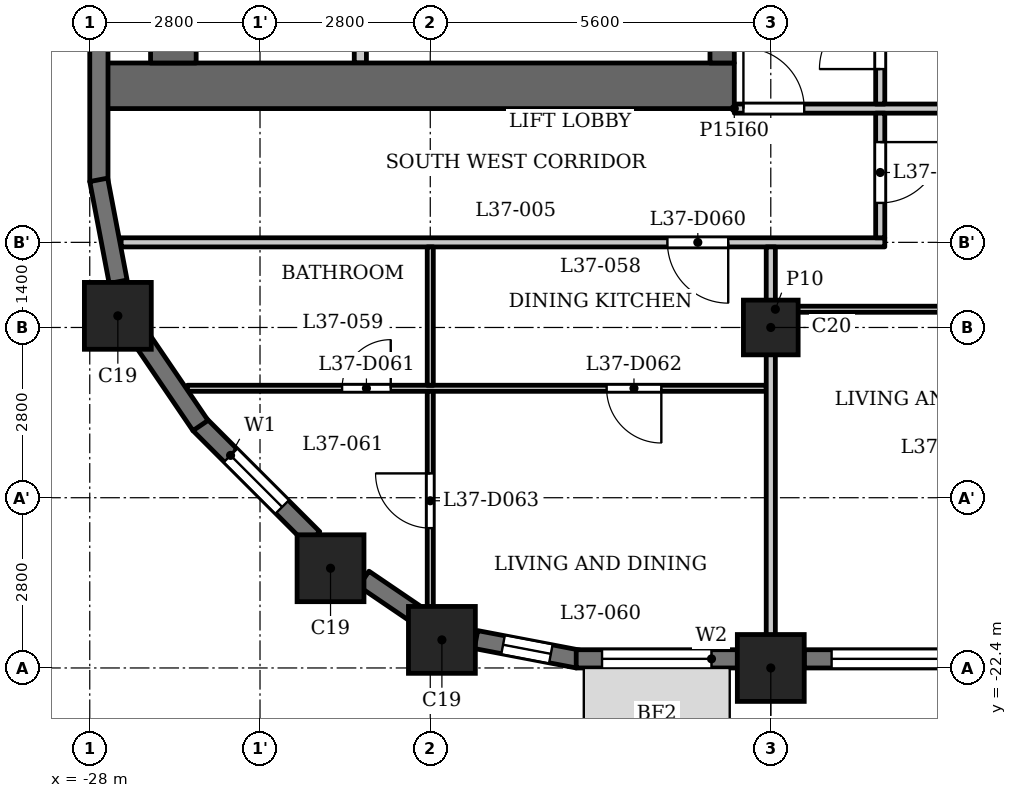
"""IFC4 building model, lengths in metres.
Left out: names, types, materials, properties, quantities, classifications, styles, units other than length and angle.
Written with IfcOpenShell. Run it as: python <this file> out.ifc"""

import sys

from ifc_helpers import new_model, si_unit, direction, frame, frame_2d, origin, origin_2d, place, context, subcontext, project, spatial, rectangle, extrude, element, fill, save


model = new_model("IFC4")
c1 = context("Model", 3, precision=1e-05, world=origin(), true_north=direction((0.0, 1.0)))
c2 = subcontext(c1, "Body", "Model", "MODEL_VIEW")
j1 = project(units=[si_unit("LENGTHUNIT", "METRE"), si_unit("PLANEANGLEUNIT", "RADIAN")], contexts=[c1])
p1 = place(None, origin())
s1 = spatial("IfcSite", under=j1, at=p1, CompositionType="ELEMENT")
p2 = place(p1, origin())
s2 = spatial("IfcBuilding", under=s1, at=p2, CompositionType="ELEMENT")
p3 = place(p2, frame((0.0, 0.0, 146.6)))
s3 = spatial("IfcBuildingStorey", under=s2, at=p3, CompositionType="ELEMENT", Elevation=146.6)
for number, where, z_axis, x_axis in (
    (1, (-22.209, -21.938, 0.0), (0.0, 0.0, 1.0), (1.0, 0.0, 0.0)),
    (2, (-16.8, -22.4, 0.0), (0.0, 0.0, 1.0), (1.0, 0.0, 0.0)),
    (3, (-27.538, -16.609, 0.0), (0.0, 0.0, 1.0), (1.0, 0.0, 0.0)),
    (4, (-24.04, -20.76, 0.0), (0.0, 0.0, 1.0), (1.0, 0.0, 0.0)),
):
    element("IfcColumn", number, at=place(p3, frame(where, z_axis=z_axis, x_axis=x_axis)), inside=s3, PredefinedType="COLUMN", context=c2, shape_type="SweptSolid", body=[
        extrude(rectangle(XDim=1.1, YDim=1.1, at=origin_2d()), origin(), (0.0, 0.0, 1.0), 3.5),
    ])
p4 = place(p3, frame((-16.8, -16.8, 0.0), z_axis=(0.0, 0.0, 1.0), x_axis=(1.0, 0.0, 0.0)))
e5 = element("IfcColumn", 5, at=p4, inside=s3, PredefinedType="COLUMN", context=c2, shape_type="SweptSolid", body=[
    extrude(rectangle(XDim=0.9, YDim=0.9, at=origin_2d()), origin(), (0.0, 0.0, 1.0), 3.5),
])
p5 = place(p3, frame((-26.197, -18.391, 0.0), z_axis=(0.0, 0.0, 1.0), x_axis=(0.707060717099, -0.707152842274, 0.0)))
e6 = element("IfcWall", 6, at=p5, inside=s3, PredefinedType="SOLIDWALL", context=c2, shape_type="SweptSolid", body=[
    extrude(rectangle(XDim=2.65, YDim=0.3, at=frame_2d((1.325, 0.0))), origin(), (0.0, 0.0, 1.0), 2.45),
])
p6 = place(p5, frame((0.725, 0.0, 0.6)))
e7 = element("IfcOpeningElement", 7, at=p6, cuts=e6, PredefinedType="OPENING", context=c2, shape_type="SweptSolid", body=[
    extrude(rectangle(XDim=1.2, YDim=1.55, at=frame_2d((0.6, 0.775))), frame((0.0, 0.16, 0.0), z_axis=(0.0, -1.0, 0.0), x_axis=(1.0, 0.0, 0.0)), (0.0, 0.0, 1.0), 0.32),
])
p7 = place(p3, frame((-23.492, -20.932, 0.0), z_axis=(0.0, 0.0, 1.0), x_axis=(0.826993959827, -0.562210806023, 0.0)))
e8 = element("IfcWall", 8, at=p7, inside=s3, PredefinedType="SOLIDWALL", context=c2, shape_type="SweptSolid", body=[
    extrude(rectangle(XDim=1.077, YDim=0.3, at=frame_2d((0.539, 0.0))), origin(), (0.0, 0.0, 1.0), 3.2),
])
p8 = place(p3, frame((-21.648, -21.933, 0.0), z_axis=(0.0, 0.0, 1.0), x_axis=(0.982297206936, -0.187329114784, 0.0)))
e9 = element("IfcWall", 9, at=p8, inside=s3, PredefinedType="SOLIDWALL", context=c2, shape_type="SweptSolid", body=[
    extrude(rectangle(XDim=1.706, YDim=0.3, at=frame_2d((0.853, 0.0))), origin(), (0.0, 0.0, 1.0), 2.45),
])
p9 = place(p8, frame((0.453, 0.0, 0.6)))
e10 = element("IfcOpeningElement", 10, at=p9, cuts=e9, PredefinedType="OPENING", context=c2, shape_type="SweptSolid", body=[
    extrude(rectangle(XDim=0.8, YDim=1.55, at=frame_2d((0.4, 0.775))), frame((0.0, 0.16, 0.0), z_axis=(0.0, -1.0, 0.0), x_axis=(1.0, 0.0, 0.0)), (0.0, 0.0, 1.0), 0.32),
])
p10 = place(p3, frame((-20.0, -22.25, 0.0), z_axis=(0.0, 0.0, 1.0), x_axis=(1.0, 0.0, 0.0)))
e11 = element("IfcWall", 11, at=p10, inside=s3, PredefinedType="SOLIDWALL", context=c2, shape_type="SweptSolid", body=[
    extrude(rectangle(XDim=2.65, YDim=0.3, at=frame_2d((1.325, 0.0))), origin(), (0.0, 0.0, 1.0), 2.45),
])
p11 = place(p10, frame((0.425, 0.0, 0.9)))
e12 = element("IfcOpeningElement", 12, at=p11, cuts=e11, PredefinedType="OPENING", context=c2, shape_type="SweptSolid", body=[
    extrude(rectangle(XDim=1.8, YDim=1.25, at=frame_2d((0.9, 0.625))), frame((0.0, 0.16, 0.0), z_axis=(0.0, -1.0, 0.0), x_axis=(1.0, 0.0, 0.0)), (0.0, 0.0, 1.0), 0.32),
])
p12 = place(p3, frame((-16.25, -22.25, 0.0), z_axis=(0.0, 0.0, 1.0), x_axis=(1.0, 0.0, 0.0)))
e13 = element("IfcWall", 13, at=p12, inside=s3, PredefinedType="SOLIDWALL", context=c2, shape_type="SweptSolid", body=[
    extrude(rectangle(XDim=4.5, YDim=0.3, at=frame_2d((2.25, 0.0))), origin(), (0.0, 0.0, 1.0), 2.45),
])
p13 = place(p12, frame((0.45, 0.0, 1.2)))
e14 = element("IfcOpeningElement", 14, at=p13, cuts=e13, PredefinedType="OPENING", context=c2, shape_type="SweptSolid", body=[
    extrude(rectangle(XDim=3.6, YDim=0.95, at=frame_2d((1.8, 0.475))), frame((0.0, 0.16, 0.0), z_axis=(0.0, -1.0, 0.0), x_axis=(1.0, 0.0, 0.0)), (0.0, 0.0, 1.0), 0.32),
])
p14 = place(p3, frame((-27.85, -11.75, 0.0), z_axis=(0.0, 0.0, 1.0), x_axis=(0.0, -1.0, 0.0)))
e15 = element("IfcWall", 15, at=p14, inside=s3, PredefinedType="SOLIDWALL", context=c2, shape_type="SweptSolid", body=[
    extrude(rectangle(XDim=2.65, YDim=0.3, at=frame_2d((1.325, 0.0))), origin(), (0.0, 0.0, 1.0), 2.45),
])
p15 = place(p3, frame((-27.853, -14.372, 0.0), z_axis=(0.0, 0.0, 1.0), x_axis=(0.187302784601, -0.982302227871, 0.0)))
e16 = element("IfcWall", 16, at=p15, inside=s3, PredefinedType="SOLIDWALL", context=c2, shape_type="SweptSolid", body=[
    extrude(rectangle(XDim=1.706, YDim=0.3, at=frame_2d((0.853, 0.0))), origin(), (0.0, 0.0, 1.0), 2.45),
])
p16 = place(p3, frame((-27.138, -17.002, 0.0), z_axis=(0.0, 0.0, 1.0), x_axis=(0.562075160946, -0.827086158419, 0.0)))
e17 = element("IfcWall", 17, at=p16, inside=s3, PredefinedType="SOLIDWALL", context=c2, shape_type="SweptSolid", body=[
    extrude(rectangle(XDim=1.706, YDim=0.3, at=frame_2d((0.853, 0.0))), origin(), (0.0, 0.0, 1.0), 2.45),
])
p17 = place(p3, frame((-17.4, -12.825, 0.0), z_axis=(0.0, 0.0, 1.0), x_axis=(-1.0, 0.0, 0.0)))
e18 = element("IfcWall", 18, at=p17, inside=s3, PredefinedType="SHEAR", context=c2, shape_type="SweptSolid", body=[
    extrude(rectangle(XDim=10.4, YDim=0.75, at=frame_2d((5.2, 0.0))), origin(), (0.0, 0.0, 1.0), 3.2),
])
p18 = place(p3, frame((-17.6, -12.45, 0.0), z_axis=(0.0, 0.0, 1.0), x_axis=(0.0, 1.0, 0.0)))
e19 = element("IfcWall", 19, at=p18, inside=s3, PredefinedType="SHEAR", context=c2, shape_type="SweptSolid", body=[
    extrude(rectangle(XDim=24.9, YDim=0.4, at=frame_2d((12.45, 0.0))), origin(), (0.0, 0.0, 1.0), 3.2),
])
p19 = place(p18, frame((6.325, 0.0, 0.0)))
e20 = element("IfcOpeningElement", 20, at=p19, cuts=e19, PredefinedType="OPENING", context=c2, shape_type="SweptSolid", body=[
    extrude(rectangle(XDim=0.9, YDim=2.1, at=frame_2d((0.45, 1.05))), frame((0.0, 0.21, 0.0), z_axis=(0.0, -1.0, 0.0), x_axis=(1.0, 0.0, 0.0)), (0.0, 0.0, 1.0), 0.42),
])
p20 = place(p18, frame((9.925, 0.0, 0.0)))
e21 = element("IfcOpeningElement", 21, at=p20, cuts=e19, PredefinedType="OPENING", context=c2, shape_type="SweptSolid", body=[
    extrude(rectangle(XDim=0.9, YDim=2.1, at=frame_2d((0.45, 1.05))), frame((0.0, 0.21, 0.0), z_axis=(0.0, -1.0, 0.0), x_axis=(1.0, 0.0, 0.0)), (0.0, 0.0, 1.0), 0.42),
])
p21 = place(p18, frame((15.6, 0.0, 0.0)))
e22 = element("IfcOpeningElement", 22, at=p21, cuts=e19, PredefinedType="OPENING", context=c2, shape_type="SweptSolid", body=[
    extrude(rectangle(XDim=1.1, YDim=2.1, at=frame_2d((0.55, 1.05))), frame((0.0, 0.21, 0.0), z_axis=(0.0, -1.0, 0.0), x_axis=(1.0, 0.0, 0.0)), (0.0, 0.0, 1.0), 0.42),
])
p22 = place(p18, frame((18.0, 0.0, 0.0)))
e23 = element("IfcOpeningElement", 23, at=p22, cuts=e19, PredefinedType="OPENING", context=c2, shape_type="SweptSolid", body=[
    extrude(rectangle(XDim=1.1, YDim=2.1, at=frame_2d((0.55, 1.05))), frame((0.0, 0.21, 0.0), z_axis=(0.0, -1.0, 0.0), x_axis=(1.0, 0.0, 0.0)), (0.0, 0.0, 1.0), 0.42),
])
p23 = place(p18, frame((23.025, 0.0, 0.0)))
e24 = element("IfcOpeningElement", 24, at=p23, cuts=e19, PredefinedType="OPENING", context=c2, shape_type="SweptSolid", body=[
    extrude(rectangle(XDim=1.1, YDim=2.1, at=frame_2d((0.55, 1.05))), frame((0.0, 0.21, 0.0), z_axis=(0.0, -1.0, 0.0), x_axis=(1.0, 0.0, 0.0)), (0.0, 0.0, 1.0), 0.42),
])
p24 = place(p18, frame((0.775, 0.0, 0.0)))
e25 = element("IfcOpeningElement", 25, at=p24, cuts=e19, PredefinedType="OPENING", context=c2, shape_type="SweptSolid", body=[
    extrude(rectangle(XDim=1.1, YDim=2.1, at=frame_2d((0.55, 1.05))), frame((0.0, 0.21, 0.0), z_axis=(0.0, -1.0, 0.0), x_axis=(1.0, 0.0, 0.0)), (0.0, 0.0, 1.0), 0.42),
])
p25 = place(p18, frame((12.925, 0.0, 0.0)))
e26 = element("IfcOpeningElement", 26, at=p25, cuts=e19, PredefinedType="OPENING", context=c2, shape_type="SweptSolid", body=[
    extrude(rectangle(XDim=1.8, YDim=2.1, at=frame_2d((0.9, 1.05))), frame((0.0, 0.21, 0.0), z_axis=(0.0, -1.0, 0.0), x_axis=(1.0, 0.0, 0.0)), (0.0, 0.0, 1.0), 0.42),
])
p26 = place(p3, frame((-26.625, -12.45, 0.0), z_axis=(0.0, 0.0, 1.0), x_axis=(0.0, 1.0, 0.0)))
e27 = element("IfcWall", 27, at=p26, inside=s3, PredefinedType="SHEAR", context=c2, shape_type="SweptSolid", body=[
    extrude(rectangle(XDim=24.9, YDim=0.75, at=frame_2d((12.45, 0.0))), origin(), (0.0, 0.0, 1.0), 3.2),
])
p27 = place(p3, frame((-23.55, -12.45, 0.0), z_axis=(0.0, 0.0, 1.0), x_axis=(0.0, 1.0, 0.0)))
e28 = element("IfcWall", 28, at=p27, inside=s3, PredefinedType="PARTITIONING", context=c2, shape_type="SweptSolid", body=[
    extrude(rectangle(XDim=2.65, YDim=0.2, at=frame_2d((1.325, 0.0))), origin(), (0.0, 0.0, 1.0), 3.2),
])
p28 = place(p27, frame((0.875, 0.0, 0.0)))
e29 = element("IfcOpeningElement", 29, at=p28, cuts=e28, PredefinedType="OPENING", context=c2, shape_type="SweptSolid", body=[
    extrude(rectangle(XDim=0.9, YDim=2.1, at=frame_2d((0.45, 1.05))), frame((0.0, 0.11, 0.0), z_axis=(0.0, -1.0, 0.0), x_axis=(1.0, 0.0, 0.0)), (0.0, 0.0, 1.0), 0.22),
])
p29 = place(p3, frame((-26.394, -17.8, 0.0), z_axis=(0.0, 0.0, 1.0), x_axis=(1.0, 0.0, 0.0)))
e30 = element("IfcWall", 30, at=p29, inside=s3, PredefinedType="PARTITIONING", context=c2, shape_type="SweptSolid", body=[
    extrude(rectangle(XDim=9.519, YDim=0.1, at=frame_2d((4.76, 0.0))), origin(), (0.0, 0.0, 1.0), 3.2),
])
p30 = place(p29, frame((2.544, 0.0, 0.0)))
e31 = element("IfcOpeningElement", 31, at=p30, cuts=e30, PredefinedType="OPENING", context=c2, shape_type="SweptSolid", body=[
    extrude(rectangle(XDim=0.8, YDim=2.1, at=frame_2d((0.4, 1.05))), frame((0.0, 0.06, 0.0), z_axis=(0.0, -1.0, 0.0), x_axis=(1.0, 0.0, 0.0)), (0.0, 0.0, 1.0), 0.12),
])
p31 = place(p29, frame((6.894, 0.0, 0.0)))
e32 = element("IfcOpeningElement", 32, at=p31, cuts=e30, PredefinedType="OPENING", context=c2, shape_type="SweptSolid", body=[
    extrude(rectangle(XDim=0.9, YDim=2.1, at=frame_2d((0.45, 1.05))), frame((0.0, 0.06, 0.0), z_axis=(0.0, -1.0, 0.0), x_axis=(1.0, 0.0, 0.0)), (0.0, 0.0, 1.0), 0.12),
])
p32 = place(p3, frame((-16.725, -16.5, 0.0), z_axis=(0.0, 0.0, 1.0), x_axis=(1.0, 0.0, 0.0)))
e33 = element("IfcWall", 33, at=p32, inside=s3, PredefinedType="PARTITIONING", context=c2, shape_type="SweptSolid", body=[
    extrude(rectangle(XDim=33.45, YDim=0.1, at=frame_2d((16.725, 0.0))), origin(), (0.0, 0.0, 1.0), 3.2),
])
p33 = place(p32, frame((9.675, 0.0, 0.0)))
e34 = element("IfcOpeningElement", 34, at=p33, cuts=e33, PredefinedType="OPENING", context=c2, shape_type="SweptSolid", body=[
    extrude(rectangle(XDim=0.8, YDim=2.1, at=frame_2d((0.4, 1.05))), frame((0.0, 0.06, 0.0), z_axis=(0.0, -1.0, 0.0), x_axis=(1.0, 0.0, 0.0)), (0.0, 0.0, 1.0), 0.12),
])
p34 = place(p32, frame((4.075, 0.0, 0.0)))
e35 = element("IfcOpeningElement", 35, at=p34, cuts=e33, PredefinedType="OPENING", context=c2, shape_type="SweptSolid", body=[
    extrude(rectangle(XDim=0.9, YDim=2.1, at=frame_2d((0.45, 1.05))), frame((0.0, 0.06, 0.0), z_axis=(0.0, -1.0, 0.0), x_axis=(1.0, 0.0, 0.0)), (0.0, 0.0, 1.0), 0.12),
])
p35 = place(p32, frame((20.875, 0.0, 0.0)))
e36 = element("IfcOpeningElement", 36, at=p35, cuts=e33, PredefinedType="OPENING", context=c2, shape_type="SweptSolid", body=[
    extrude(rectangle(XDim=0.8, YDim=2.1, at=frame_2d((0.4, 1.05))), frame((0.0, 0.06, 0.0), z_axis=(0.0, -1.0, 0.0), x_axis=(1.0, 0.0, 0.0)), (0.0, 0.0, 1.0), 0.12),
])
p36 = place(p32, frame((15.275, 0.0, 0.0)))
e37 = element("IfcOpeningElement", 37, at=p36, cuts=e33, PredefinedType="OPENING", context=c2, shape_type="SweptSolid", body=[
    extrude(rectangle(XDim=0.9, YDim=2.1, at=frame_2d((0.45, 1.05))), frame((0.0, 0.06, 0.0), z_axis=(0.0, -1.0, 0.0), x_axis=(1.0, 0.0, 0.0)), (0.0, 0.0, 1.0), 0.12),
])
p37 = place(p32, frame((26.475, 0.0, 0.0)))
e38 = element("IfcOpeningElement", 38, at=p37, cuts=e33, PredefinedType="OPENING", context=c2, shape_type="SweptSolid", body=[
    extrude(rectangle(XDim=0.8, YDim=2.1, at=frame_2d((0.4, 1.05))), frame((0.0, 0.06, 0.0), z_axis=(0.0, -1.0, 0.0), x_axis=(1.0, 0.0, 0.0)), (0.0, 0.0, 1.0), 0.12),
])
p38 = place(p32, frame((30.575, 0.0, 0.0)))
e39 = element("IfcOpeningElement", 39, at=p38, cuts=e33, PredefinedType="OPENING", context=c2, shape_type="SweptSolid", body=[
    extrude(rectangle(XDim=0.9, YDim=2.1, at=frame_2d((0.45, 1.05))), frame((0.0, 0.06, 0.0), z_axis=(0.0, -1.0, 0.0), x_axis=(1.0, 0.0, 0.0)), (0.0, 0.0, 1.0), 0.12),
])
p39 = place(p3, frame((-27.484, -15.4, 0.0), z_axis=(0.0, 0.0, 1.0), x_axis=(1.0, 0.0, 0.0)))
e40 = element("IfcWall", 40, at=p39, inside=s3, PredefinedType="PARTITIONING", context=c2, shape_type="SweptSolid", body=[
    extrude(rectangle(XDim=12.559, YDim=0.15, at=frame_2d((6.279, 0.0))), origin(), (0.0, 0.0, 1.0), 3.2),
])
p40 = place(p39, frame((8.984, 0.0, 0.0)))
e41 = element("IfcOpeningElement", 41, at=p40, cuts=e40, PredefinedType="OPENING", context=c2, shape_type="SweptSolid", body=[
    extrude(rectangle(XDim=1.0, YDim=2.1, at=frame_2d((0.5, 1.05))), frame((0.0, 0.085, 0.0), z_axis=(0.0, -1.0, 0.0), x_axis=(1.0, 0.0, 0.0)), (0.0, 0.0, 1.0), 0.17),
])
p41 = place(p3, frame((-17.4, -13.2, 0.0), z_axis=(0.0, 0.0, 1.0), x_axis=(1.0, 0.0, 0.0)))
e42 = element("IfcWall", 42, at=p41, inside=s3, PredefinedType="PARTITIONING", context=c2, shape_type="SweptSolid", body=[
    extrude(rectangle(XDim=34.8, YDim=0.15, at=frame_2d((17.4, 0.0))), origin(), (0.0, 0.0, 1.0), 3.2),
])
p42 = place(p41, frame((0.15, 0.0, 0.0)))
e43 = element("IfcOpeningElement", 43, at=p42, cuts=e42, PredefinedType="OPENING", context=c2, shape_type="SweptSolid", body=[
    extrude(rectangle(XDim=1.0, YDim=2.1, at=frame_2d((0.5, 1.05))), frame((0.0, 0.085, 0.0), z_axis=(0.0, -1.0, 0.0), x_axis=(1.0, 0.0, 0.0)), (0.0, 0.0, 1.0), 0.17),
])
p43 = place(p41, frame((33.55, 0.0, 0.0)))
e44 = element("IfcOpeningElement", 44, at=p43, cuts=e42, PredefinedType="OPENING", context=c2, shape_type="SweptSolid", body=[
    extrude(rectangle(XDim=1.0, YDim=2.1, at=frame_2d((0.5, 1.05))), frame((0.0, 0.085, 0.0), z_axis=(0.0, -1.0, 0.0), x_axis=(1.0, 0.0, 0.0)), (0.0, 0.0, 1.0), 0.17),
])
p44 = place(p41, frame((15.7, 0.0, 0.0)))
e45 = element("IfcOpeningElement", 45, at=p44, cuts=e42, PredefinedType="OPENING", context=c2, shape_type="SweptSolid", body=[
    extrude(rectangle(XDim=1.0, YDim=2.1, at=frame_2d((0.5, 1.05))), frame((0.0, 0.085, 0.0), z_axis=(0.0, -1.0, 0.0), x_axis=(1.0, 0.0, 0.0)), (0.0, 0.0, 1.0), 0.17),
])
p45 = place(p3, frame((-22.4, -21.72, 0.0), z_axis=(0.0, 0.0, 1.0), x_axis=(0.0, 1.0, 0.0)))
e46 = element("IfcWall", 46, at=p45, inside=s3, PredefinedType="PARTITIONING", context=c2, shape_type="SweptSolid", body=[
    extrude(rectangle(XDim=3.87, YDim=0.1, at=frame_2d((1.935, 0.0))), origin(), (0.0, 0.0, 1.0), 3.2),
])
p46 = place(p45, frame((1.62, 0.0, 0.0)))
e47 = element("IfcOpeningElement", 47, at=p46, cuts=e46, PredefinedType="OPENING", context=c2, shape_type="SweptSolid", body=[
    extrude(rectangle(XDim=0.9, YDim=2.1, at=frame_2d((0.45, 1.05))), frame((0.0, 0.06, 0.0), z_axis=(0.0, -1.0, 0.0), x_axis=(1.0, 0.0, 0.0)), (0.0, 0.0, 1.0), 0.12),
])
p47 = place(p3, frame((-22.4, -17.75, 0.0), z_axis=(0.0, 0.0, 1.0), x_axis=(0.0, 1.0, 0.0)))
e48 = element("IfcWall", 48, at=p47, inside=s3, PredefinedType="PARTITIONING", context=c2, shape_type="SweptSolid", body=[
    extrude(rectangle(XDim=2.275, YDim=0.1, at=frame_2d((1.137, 0.0))), origin(), (0.0, 0.0, 1.0), 3.2),
])
p48 = place(p3, frame((-16.8, -22.93, 0.0), z_axis=(0.0, 0.0, 1.0), x_axis=(0.0, 1.0, 0.0)))
e49 = element("IfcWall", 49, at=p48, inside=s3, PredefinedType="PARTITIONING", context=c2, shape_type="SweptSolid", body=[
    extrude(rectangle(XDim=7.455, YDim=0.15, at=frame_2d((3.728, 0.0))), origin(), (0.0, 0.0, 1.0), 3.2),
])
p49 = place(p3, frame((-15.0, -15.325, 0.0), z_axis=(0.0, 0.0, 1.0), x_axis=(0.0, 1.0, 0.0)))
e50 = element("IfcWall", 50, at=p49, inside=s3, PredefinedType="PARTITIONING", context=c2, shape_type="SweptSolid", body=[
    extrude(rectangle(XDim=2.05, YDim=0.15, at=frame_2d((1.025, 0.0))), origin(), (0.0, 0.0, 1.0), 3.2),
])
p50 = place(p49, frame((0.574, 0.0, 0.0)))
e51 = element("IfcOpeningElement", 51, at=p50, cuts=e50, PredefinedType="OPENING", context=c2, shape_type="SweptSolid", body=[
    extrude(rectangle(XDim=1.0, YDim=2.1, at=frame_2d((0.5, 1.05))), frame((0.0, 0.085, 0.0), z_axis=(0.0, -1.0, 0.0), x_axis=(1.0, 0.0, 0.0)), (0.0, 0.0, 1.0), 0.17),
])
p51 = place(p3, frame((-15.0, -13.125, 0.0), z_axis=(0.0, 0.0, 1.0), x_axis=(0.0, 1.0, 0.0)))
e52 = element("IfcWall", 52, at=p51, inside=s3, PredefinedType="PARTITIONING", context=c2, shape_type="SweptSolid", body=[
    extrude(rectangle(XDim=6.356, YDim=0.15, at=frame_2d((3.178, 0.0))), origin(), (0.0, 0.0, 1.0), 3.2),
])
p52 = place(p51, frame((0.575, 0.0, 0.0)))
e53 = element("IfcOpeningElement", 53, at=p52, cuts=e52, PredefinedType="OPENING", context=c2, shape_type="SweptSolid", body=[
    extrude(rectangle(XDim=1.0, YDim=2.1, at=frame_2d((0.5, 1.05))), frame((0.0, 0.085, 0.0), z_axis=(0.0, -1.0, 0.0), x_axis=(1.0, 0.0, 0.0)), (0.0, 0.0, 1.0), 0.17),
])
p53 = place(p52, origin())
e54 = element("IfcDoor", 54, at=p53, inside=s3, OperationType="SINGLE_SWING_RIGHT", PredefinedType="DOOR", context=c2, shape_type="SweptSolid", body=[
    extrude(rectangle(XDim=1.0, YDim=2.1, at=frame_2d((0.5, 1.05))), frame((0.0, 0.025, 0.0), z_axis=(0.0, -1.0, 0.0), x_axis=(1.0, 0.0, 0.0)), (0.0, 0.0, 1.0), 0.05),
])
fill(e53, e54)
p54 = place(p42, origin())
e55 = element("IfcDoor", 55, at=p54, inside=s3, OperationType="SINGLE_SWING_RIGHT", PredefinedType="DOOR", context=c2, shape_type="SweptSolid", body=[
    extrude(rectangle(XDim=1.0, YDim=2.1, at=frame_2d((0.5, 1.05))), frame((0.0, 0.025, 0.0), z_axis=(0.0, -1.0, 0.0), x_axis=(1.0, 0.0, 0.0)), (0.0, 0.0, 1.0), 0.05),
])
fill(e43, e55)
p55 = place(p50, origin())
e56 = element("IfcDoor", 56, at=p55, inside=s3, OperationType="SINGLE_SWING_RIGHT", PredefinedType="DOOR", context=c2, shape_type="SweptSolid", body=[
    extrude(rectangle(XDim=1.0, YDim=2.1, at=frame_2d((0.5, 1.05))), frame((0.0, 0.025, 0.0), z_axis=(0.0, -1.0, 0.0), x_axis=(1.0, 0.0, 0.0)), (0.0, 0.0, 1.0), 0.05),
])
fill(e51, e56)
p56 = place(p40, origin())
e57 = element("IfcDoor", 57, at=p56, inside=s3, OperationType="SINGLE_SWING_RIGHT", PredefinedType="DOOR", context=c2, shape_type="SweptSolid", body=[
    extrude(rectangle(XDim=1.0, YDim=2.1, at=frame_2d((0.5, 1.05))), frame((0.0, 0.025, 0.0), z_axis=(0.0, -1.0, 0.0), x_axis=(1.0, 0.0, 0.0)), (0.0, 0.0, 1.0), 0.05),
])
fill(e41, e57)
p57 = place(p30, origin())
e58 = element("IfcDoor", 58, at=p57, inside=s3, OperationType="SINGLE_SWING_LEFT", PredefinedType="DOOR", context=c2, shape_type="SweptSolid", body=[
    extrude(rectangle(XDim=0.8, YDim=2.1, at=frame_2d((0.4, 1.05))), frame((0.0, 0.025, 0.0), z_axis=(0.0, -1.0, 0.0), x_axis=(1.0, 0.0, 0.0)), (0.0, 0.0, 1.0), 0.05),
])
fill(e31, e58)
p58 = place(p31, origin())
e59 = element("IfcDoor", 59, at=p58, inside=s3, OperationType="SINGLE_SWING_RIGHT", PredefinedType="DOOR", context=c2, shape_type="SweptSolid", body=[
    extrude(rectangle(XDim=0.9, YDim=2.1, at=frame_2d((0.45, 1.05))), frame((0.0, 0.025, 0.0), z_axis=(0.0, -1.0, 0.0), x_axis=(1.0, 0.0, 0.0)), (0.0, 0.0, 1.0), 0.05),
])
fill(e32, e59)
p59 = place(p46, origin())
e60 = element("IfcDoor", 60, at=p59, inside=s3, OperationType="SINGLE_SWING_LEFT", PredefinedType="DOOR", context=c2, shape_type="SweptSolid", body=[
    extrude(rectangle(XDim=0.9, YDim=2.1, at=frame_2d((0.45, 1.05))), frame((0.0, 0.025, 0.0), z_axis=(0.0, -1.0, 0.0), x_axis=(1.0, 0.0, 0.0)), (0.0, 0.0, 1.0), 0.05),
])
fill(e47, e60)
p60 = place(p6, origin())
e61 = element("IfcWindow", 61, at=p60, inside=s3, PartitioningType="SINGLE_PANEL", PredefinedType="WINDOW", context=c2, shape_type="SweptSolid", body=[
    extrude(rectangle(XDim=1.2, YDim=1.55, at=frame_2d((0.6, 0.775))), frame((0.0, 0.03, 0.0), z_axis=(0.0, -1.0, 0.0), x_axis=(1.0, 0.0, 0.0)), (0.0, 0.0, 1.0), 0.06),
])
fill(e7, e61)
p61 = place(p9, origin())
e62 = element("IfcWindow", 62, at=p61, inside=s3, PartitioningType="SINGLE_PANEL", PredefinedType="WINDOW", context=c2, shape_type="SweptSolid", body=[
    extrude(rectangle(XDim=0.8, YDim=1.55, at=frame_2d((0.4, 0.775))), frame((0.0, 0.03, 0.0), z_axis=(0.0, -1.0, 0.0), x_axis=(1.0, 0.0, 0.0)), (0.0, 0.0, 1.0), 0.06),
])
fill(e10, e62)
p62 = place(p11, origin())
e63 = element("IfcWindow", 63, at=p62, inside=s3, PartitioningType="SINGLE_PANEL", PredefinedType="WINDOW", context=c2, shape_type="SweptSolid", body=[
    extrude(rectangle(XDim=1.8, YDim=1.25, at=frame_2d((0.9, 0.625))), frame((0.0, 0.03, 0.0), z_axis=(0.0, -1.0, 0.0), x_axis=(1.0, 0.0, 0.0)), (0.0, 0.0, 1.0), 0.06),
])
fill(e12, e63)
p63 = place(p13, origin())
e64 = element("IfcWindow", 64, at=p63, inside=s3, PartitioningType="SINGLE_PANEL", PredefinedType="WINDOW", context=c2, shape_type="SweptSolid", body=[
    extrude(rectangle(XDim=3.6, YDim=0.95, at=frame_2d((1.8, 0.475))), frame((0.0, 0.03, 0.0), z_axis=(0.0, -1.0, 0.0), x_axis=(1.0, 0.0, 0.0)), (0.0, 0.0, 1.0), 0.06),
])
fill(e14, e64)
save(model, sys.argv[1])
